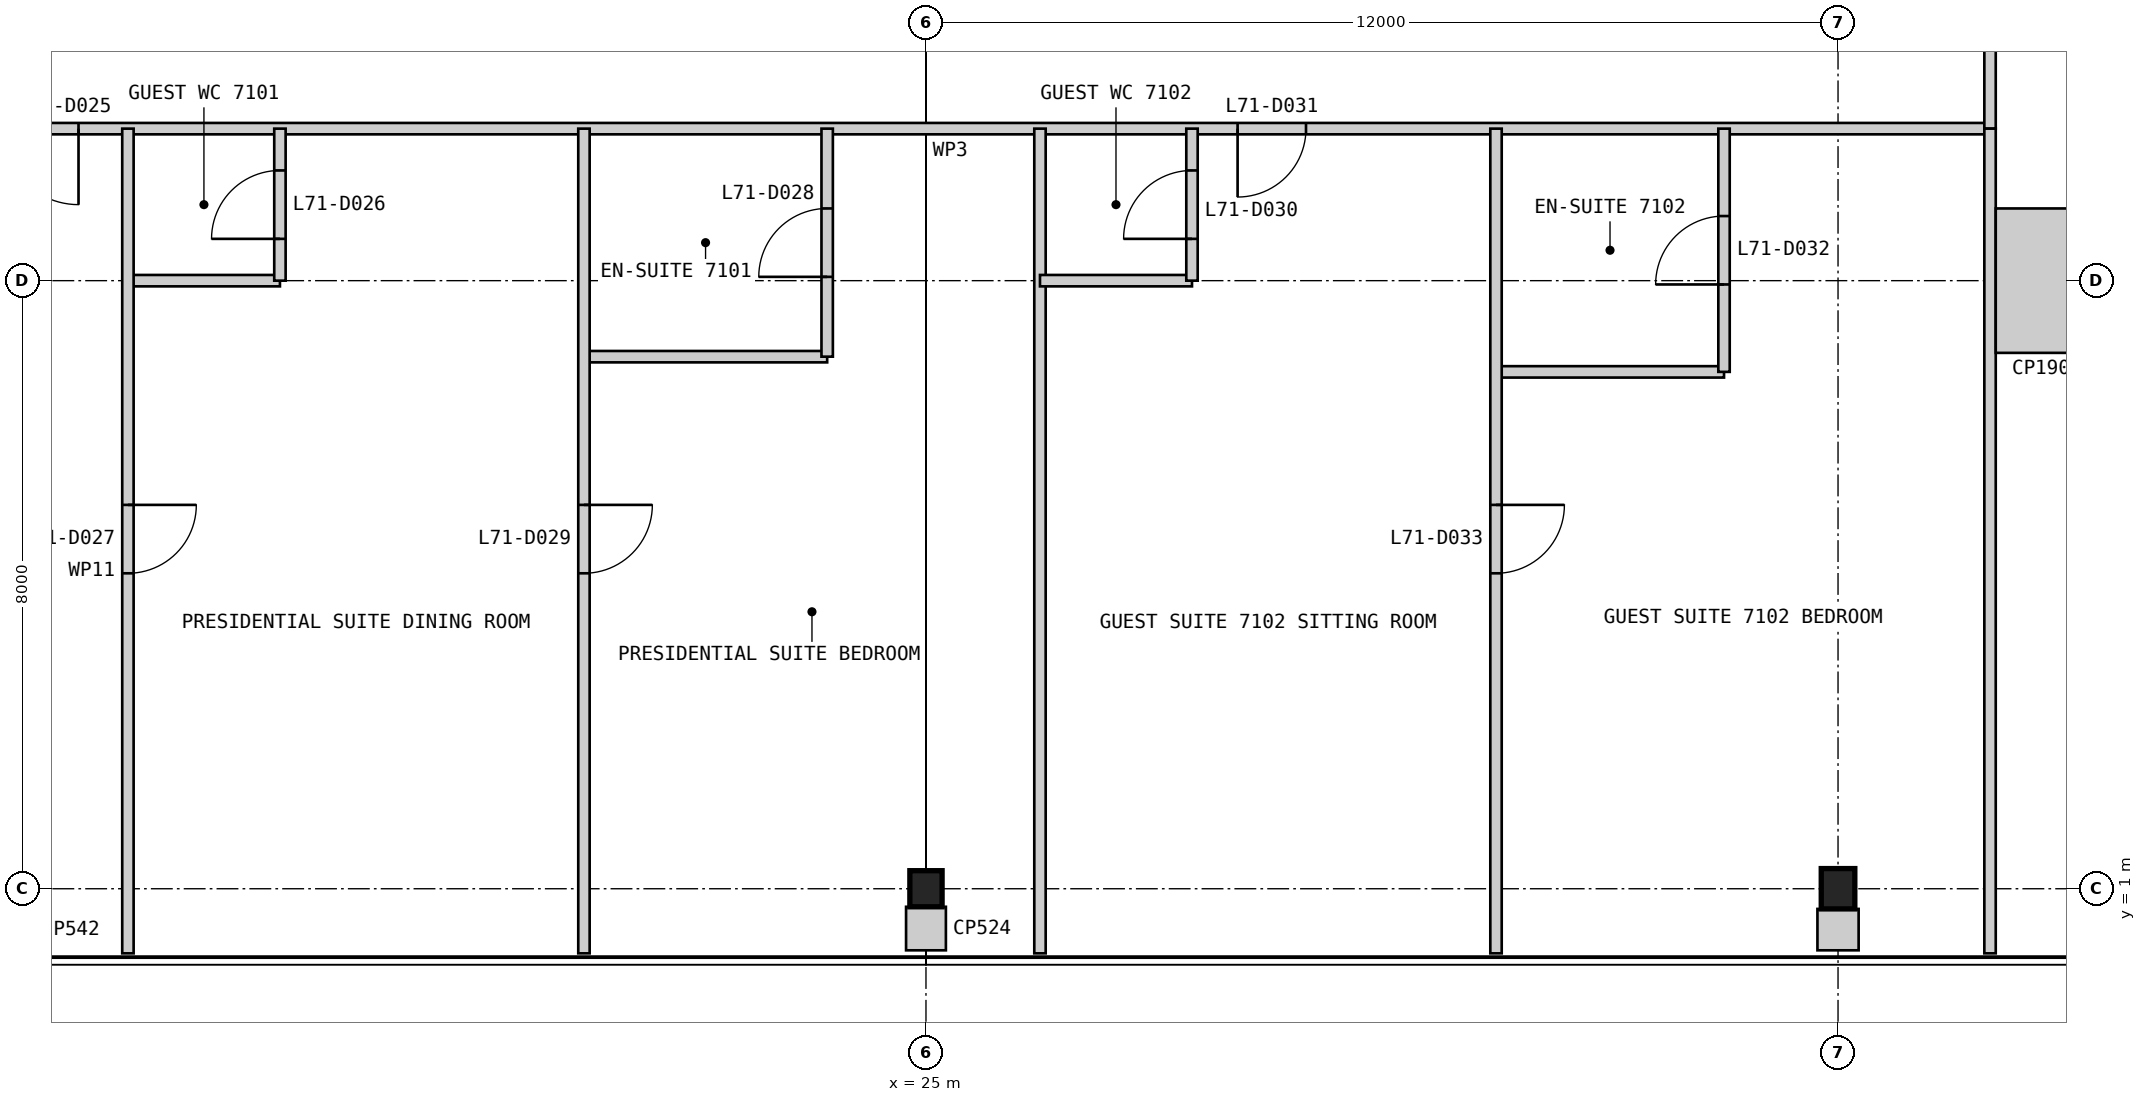
"""IFC4 building model, lengths in metres.
Left out: names, types, materials, properties, quantities, classifications, styles, units other than length and angle.
Written with IfcOpenShell. Run it as: python <this file> out.ifc"""

import sys

from ifc_helpers import new_model, si_unit, direction, frame, frame_2d, origin, origin_2d, place, context, subcontext, project, spatial, rectangle, i_section, extrude, element, fill, save


model = new_model("IFC4")
c1 = context("Model", 3, precision=1e-05, world=origin(), true_north=direction((0.0, 1.0)))
c2 = subcontext(c1, "Body", "Model", "MODEL_VIEW")
j1 = project(units=[si_unit("LENGTHUNIT", "METRE"), si_unit("PLANEANGLEUNIT", "RADIAN")], contexts=[c1])
p1 = place(None, origin())
s1 = spatial("IfcSite", under=j1, at=p1, CompositionType="ELEMENT")
p2 = place(p1, origin())
s2 = spatial("IfcBuilding", under=s1, at=p2, CompositionType="ELEMENT")
p3 = place(p2, frame((0.0, 0.0, 293.4)))
s3 = spatial("IfcBuildingStorey", under=s2, at=p3, CompositionType="ELEMENT", Elevation=293.4)
p4 = place(p3, frame((25.0, 1.0, 0.0), z_axis=(0.0, 0.0, 1.0), x_axis=(1.0, 0.0, 0.0)))
e1 = element("IfcColumn", 1, at=p4, inside=s3, PredefinedType="COLUMN", context=c2, shape_type="SweptSolid", body=[
    extrude(i_section(OverallWidth=0.424, OverallDepth=0.475, WebThickness=0.048, FlangeThickness=0.077, at=origin_2d()), origin(), (0.0, 0.0, 1.0), 3.4),
])
p5 = place(p3, frame((37.0, 1.0, 0.0), z_axis=(0.0, 0.0, 1.0), x_axis=(1.0, 0.0, 0.0)))
e2 = element("IfcColumn", 2, at=p5, inside=s3, PredefinedType="COLUMN", context=c2, shape_type="SweptSolid", body=[
    extrude(i_section(OverallWidth=0.442, OverallDepth=0.531, WebThickness=0.066, FlangeThickness=0.106, at=origin_2d()), origin(), (0.0, 0.0, 1.0), 3.4),
])
p6 = place(p3, frame((11.0, 11.0, 0.0), z_axis=(0.0, 0.0, 1.0), x_axis=(1.0, 0.0, 0.0)))
e3 = element("IfcWall", 3, at=p6, inside=s3, PredefinedType="PARTITIONING", context=c2, shape_type="SweptSolid", body=[
    extrude(rectangle(XDim=28.0, YDim=0.15, at=frame_2d((14.0, 0.0))), origin(), (0.0, 0.0, 1.0), 2.794),
])
p7 = place(p6, frame((1.85, 0.0, 0.0)))
e4 = element("IfcOpeningElement", 4, at=p7, cuts=e3, PredefinedType="OPENING", context=c2, shape_type="SweptSolid", body=[
    extrude(rectangle(XDim=1.0, YDim=2.1, at=frame_2d((0.5, 1.05))), frame((0.0, 0.085, 0.0), z_axis=(0.0, -1.0, 0.0), x_axis=(1.0, 0.0, 0.0)), (0.0, 0.0, 1.0), 0.17),
])
p8 = place(p6, frame((18.1, 0.0, 0.0)))
e5 = element("IfcOpeningElement", 5, at=p8, cuts=e3, PredefinedType="OPENING", context=c2, shape_type="SweptSolid", body=[
    extrude(rectangle(XDim=0.9, YDim=2.1, at=frame_2d((0.45, 1.05))), frame((0.0, 0.085, 0.0), z_axis=(0.0, -1.0, 0.0), x_axis=(1.0, 0.0, 0.0)), (0.0, 0.0, 1.0), 0.17),
])
p9 = place(p3, frame((14.5, 9.0, 0.0), z_axis=(0.0, 0.0, 1.0), x_axis=(1.0, 0.0, 0.0)))
e6 = element("IfcWall", 6, at=p9, inside=s3, PredefinedType="PARTITIONING", context=c2, shape_type="SweptSolid", body=[
    extrude(rectangle(XDim=2.0, YDim=0.15, at=frame_2d((1.0, 0.0))), origin(), (0.0, 0.0, 1.0), 3.2),
])
p10 = place(p3, frame((16.5, 9.0, 0.0), z_axis=(0.0, 0.0, 1.0), x_axis=(0.0, 1.0, 0.0)))
e7 = element("IfcWall", 7, at=p10, inside=s3, PredefinedType="PARTITIONING", context=c2, shape_type="SweptSolid", body=[
    extrude(rectangle(XDim=2.0, YDim=0.15, at=frame_2d((1.0, 0.0))), origin(), (0.0, 0.0, 1.0), 3.2),
])
p11 = place(p10, frame((0.55, 0.0, 0.0)))
e8 = element("IfcOpeningElement", 8, at=p11, cuts=e7, PredefinedType="OPENING", context=c2, shape_type="SweptSolid", body=[
    extrude(rectangle(XDim=0.9, YDim=2.1, at=frame_2d((0.45, 1.05))), frame((0.0, 0.085, 0.0), z_axis=(0.0, -1.0, 0.0), x_axis=(1.0, 0.0, 0.0)), (0.0, 0.0, 1.0), 0.17),
])
p12 = place(p3, frame((14.5, 0.15, 0.0), z_axis=(0.0, 0.0, 1.0), x_axis=(0.0, 1.0, 0.0)))
e9 = element("IfcWall", 9, at=p12, inside=s3, PredefinedType="PARTITIONING", context=c2, shape_type="SweptSolid", body=[
    extrude(rectangle(XDim=10.85, YDim=0.15, at=frame_2d((5.425, 0.0))), origin(), (0.0, 0.0, 1.0), 3.2),
])
p13 = place(p12, frame((5.0, 0.0, 0.0)))
e10 = element("IfcOpeningElement", 10, at=p13, cuts=e9, PredefinedType="OPENING", context=c2, shape_type="SweptSolid", body=[
    extrude(rectangle(XDim=0.9, YDim=2.1, at=frame_2d((0.45, 1.05))), frame((0.0, 0.085, 0.0), z_axis=(0.0, -1.0, 0.0), x_axis=(1.0, 0.0, 0.0)), (0.0, 0.0, 1.0), 0.17),
])
p14 = place(p3, frame((20.5, 8.0, 0.0), z_axis=(0.0, 0.0, 1.0), x_axis=(1.0, 0.0, 0.0)))
e11 = element("IfcWall", 11, at=p14, inside=s3, PredefinedType="PARTITIONING", context=c2, shape_type="SweptSolid", body=[
    extrude(rectangle(XDim=3.2, YDim=0.15, at=frame_2d((1.6, 0.0))), origin(), (0.0, 0.0, 1.0), 3.2),
])
p15 = place(p3, frame((23.7, 8.0, 0.0), z_axis=(0.0, 0.0, 1.0), x_axis=(0.0, 1.0, 0.0)))
e12 = element("IfcWall", 12, at=p15, inside=s3, PredefinedType="PARTITIONING", context=c2, shape_type="SweptSolid", body=[
    extrude(rectangle(XDim=3.0, YDim=0.15, at=frame_2d((1.5, 0.0))), origin(), (0.0, 0.0, 1.0), 3.2),
])
p16 = place(p15, frame((1.05, 0.0, 0.0)))
e13 = element("IfcOpeningElement", 13, at=p16, cuts=e12, PredefinedType="OPENING", context=c2, shape_type="SweptSolid", body=[
    extrude(rectangle(XDim=0.9, YDim=2.1, at=frame_2d((0.45, 1.05))), frame((0.0, 0.085, 0.0), z_axis=(0.0, -1.0, 0.0), x_axis=(1.0, 0.0, 0.0)), (0.0, 0.0, 1.0), 0.17),
])
p17 = place(p3, frame((20.5, 0.15, 0.0), z_axis=(0.0, 0.0, 1.0), x_axis=(0.0, 1.0, 0.0)))
e14 = element("IfcWall", 14, at=p17, inside=s3, PredefinedType="PARTITIONING", context=c2, shape_type="SweptSolid", body=[
    extrude(rectangle(XDim=10.85, YDim=0.15, at=frame_2d((5.425, 0.0))), origin(), (0.0, 0.0, 1.0), 3.2),
])
p18 = place(p17, frame((5.0, 0.0, 0.0)))
e15 = element("IfcOpeningElement", 15, at=p18, cuts=e14, PredefinedType="OPENING", context=c2, shape_type="SweptSolid", body=[
    extrude(rectangle(XDim=0.9, YDim=2.1, at=frame_2d((0.45, 1.05))), frame((0.0, 0.085, 0.0), z_axis=(0.0, -1.0, 0.0), x_axis=(1.0, 0.0, 0.0)), (0.0, 0.0, 1.0), 0.17),
])
p19 = place(p3, frame((26.5, 0.15, 0.0), z_axis=(0.0, 0.0, 1.0), x_axis=(0.0, 1.0, 0.0)))
e16 = element("IfcWall", 16, at=p19, inside=s3, PredefinedType="PARTITIONING", context=c2, shape_type="SweptSolid", body=[
    extrude(rectangle(XDim=10.85, YDim=0.15, at=frame_2d((5.425, 0.0))), origin(), (0.0, 0.0, 1.0), 3.2),
])
p20 = place(p3, frame((26.5, 9.0, 0.0), z_axis=(0.0, 0.0, 1.0), x_axis=(1.0, 0.0, 0.0)))
e17 = element("IfcWall", 17, at=p20, inside=s3, PredefinedType="PARTITIONING", context=c2, shape_type="SweptSolid", body=[
    extrude(rectangle(XDim=2.0, YDim=0.15, at=frame_2d((1.0, 0.0))), origin(), (0.0, 0.0, 1.0), 3.2),
])
p21 = place(p3, frame((28.5, 9.0, 0.0), z_axis=(0.0, 0.0, 1.0), x_axis=(0.0, 1.0, 0.0)))
e18 = element("IfcWall", 18, at=p21, inside=s3, PredefinedType="PARTITIONING", context=c2, shape_type="SweptSolid", body=[
    extrude(rectangle(XDim=2.0, YDim=0.15, at=frame_2d((1.0, 0.0))), origin(), (0.0, 0.0, 1.0), 3.2),
])
p22 = place(p21, frame((0.55, 0.0, 0.0)))
e19 = element("IfcOpeningElement", 19, at=p22, cuts=e18, PredefinedType="OPENING", context=c2, shape_type="SweptSolid", body=[
    extrude(rectangle(XDim=0.9, YDim=2.1, at=frame_2d((0.45, 1.05))), frame((0.0, 0.085, 0.0), z_axis=(0.0, -1.0, 0.0), x_axis=(1.0, 0.0, 0.0)), (0.0, 0.0, 1.0), 0.17),
])
p23 = place(p3, frame((32.5, 7.8, 0.0), z_axis=(0.0, 0.0, 1.0), x_axis=(1.0, 0.0, 0.0)))
e20 = element("IfcWall", 20, at=p23, inside=s3, PredefinedType="PARTITIONING", context=c2, shape_type="SweptSolid", body=[
    extrude(rectangle(XDim=3.0, YDim=0.15, at=frame_2d((1.5, 0.0))), origin(), (0.0, 0.0, 1.0), 3.2),
])
p24 = place(p3, frame((35.5, 7.8, 0.0), z_axis=(0.0, 0.0, 1.0), x_axis=(0.0, 1.0, 0.0)))
e21 = element("IfcWall", 21, at=p24, inside=s3, PredefinedType="PARTITIONING", context=c2, shape_type="SweptSolid", body=[
    extrude(rectangle(XDim=3.2, YDim=0.15, at=frame_2d((1.6, 0.0))), origin(), (0.0, 0.0, 1.0), 3.2),
])
p25 = place(p24, frame((1.15, 0.0, 0.0)))
e22 = element("IfcOpeningElement", 22, at=p25, cuts=e21, PredefinedType="OPENING", context=c2, shape_type="SweptSolid", body=[
    extrude(rectangle(XDim=0.9, YDim=2.1, at=frame_2d((0.45, 1.05))), frame((0.0, 0.085, 0.0), z_axis=(0.0, -1.0, 0.0), x_axis=(1.0, 0.0, 0.0)), (0.0, 0.0, 1.0), 0.17),
])
p26 = place(p3, frame((32.5, 0.15, 0.0), z_axis=(0.0, 0.0, 1.0), x_axis=(0.0, 1.0, 0.0)))
e23 = element("IfcWall", 23, at=p26, inside=s3, PredefinedType="PARTITIONING", context=c2, shape_type="SweptSolid", body=[
    extrude(rectangle(XDim=10.85, YDim=0.15, at=frame_2d((5.425, 0.0))), origin(), (0.0, 0.0, 1.0), 3.2),
])
p27 = place(p26, frame((5.0, 0.0, 0.0)))
e24 = element("IfcOpeningElement", 24, at=p27, cuts=e23, PredefinedType="OPENING", context=c2, shape_type="SweptSolid", body=[
    extrude(rectangle(XDim=0.9, YDim=2.1, at=frame_2d((0.45, 1.05))), frame((0.0, 0.085, 0.0), z_axis=(0.0, -1.0, 0.0), x_axis=(1.0, 0.0, 0.0)), (0.0, 0.0, 1.0), 0.17),
])
p28 = place(p3, frame((39.0, 11.0, 0.0), z_axis=(0.0, 0.0, 1.0), x_axis=(0.0, 1.0, 0.0)))
e25 = element("IfcWall", 25, at=p28, inside=s3, PredefinedType="PARTITIONING", context=c2, shape_type="SweptSolid", body=[
    extrude(rectangle(XDim=28.0, YDim=0.15, at=frame_2d((14.0, 0.0))), origin(), (0.0, 0.0, 1.0), 2.794),
])
p29 = place(p28, frame((1.85, 0.0, 0.0)))
e26 = element("IfcOpeningElement", 26, at=p29, cuts=e25, PredefinedType="OPENING", context=c2, shape_type="SweptSolid", body=[
    extrude(rectangle(XDim=0.9, YDim=2.1, at=frame_2d((0.45, 1.05))), frame((0.0, 0.085, 0.0), z_axis=(0.0, -1.0, 0.0), x_axis=(1.0, 0.0, 0.0)), (0.0, 0.0, 1.0), 0.17),
])
p30 = place(p28, frame((11.0, 0.0, 0.0)))
e27 = element("IfcOpeningElement", 27, at=p30, cuts=e25, PredefinedType="OPENING", context=c2, shape_type="SweptSolid", body=[
    extrude(rectangle(XDim=0.9, YDim=2.1, at=frame_2d((0.45, 1.05))), frame((0.0, 0.085, 0.0), z_axis=(0.0, -1.0, 0.0), x_axis=(1.0, 0.0, 0.0)), (0.0, 0.0, 1.0), 0.17),
])
p31 = place(p28, frame((23.1, 0.0, 0.0)))
e28 = element("IfcOpeningElement", 28, at=p31, cuts=e25, PredefinedType="OPENING", context=c2, shape_type="SweptSolid", body=[
    extrude(rectangle(XDim=0.9, YDim=2.1, at=frame_2d((0.45, 1.05))), frame((0.0, 0.085, 0.0), z_axis=(0.0, -1.0, 0.0), x_axis=(1.0, 0.0, 0.0)), (0.0, 0.0, 1.0), 0.17),
])
p32 = place(p3, frame((39.0, 0.15, 0.0), z_axis=(0.0, 0.0, 1.0), x_axis=(0.0, 1.0, 0.0)))
e29 = element("IfcWall", 29, at=p32, inside=s3, PredefinedType="PARTITIONING", context=c2, shape_type="SweptSolid", body=[
    extrude(rectangle(XDim=10.85, YDim=0.15, at=frame_2d((5.425, 0.0))), origin(), (0.0, 0.0, 1.0), 2.794),
])
p33 = place(p3, frame((25.0, 0.19, 0.0), z_axis=(0.0, 0.0, 1.0), x_axis=(0.0, 1.0, 0.0)))
e30 = element("IfcWall", 30, at=p33, inside=s3, PredefinedType="PARTITIONING", context=c2, shape_type="SweptSolid", body=[
    extrude(rectangle(XDim=0.573, YDim=0.524, at=frame_2d((0.286, 0.0))), origin(), (0.0, 0.0, 1.0), 3.2),
])
p34 = place(p3, frame((37.0, 0.19, 0.0), z_axis=(0.0, 0.0, 1.0), x_axis=(0.0, 1.0, 0.0)))
e31 = element("IfcWall", 31, at=p34, inside=s3, PredefinedType="PARTITIONING", context=c2, shape_type="SweptSolid", body=[
    extrude(rectangle(XDim=0.545, YDim=0.542, at=frame_2d((0.272, 0.0))), origin(), (0.0, 0.0, 1.0), 3.2),
])
p35 = place(p3, frame((39.075, 9.0, 0.0), z_axis=(0.0, 0.0, 1.0), x_axis=(1.0, 0.0, 0.0)))
e32 = element("IfcWall", 32, at=p35, inside=s3, PredefinedType="PARTITIONING", context=c2, shape_type="SweptSolid", body=[
    extrude(rectangle(XDim=1.025, YDim=1.9, at=frame_2d((0.513, 0.0))), origin(), (0.0, 0.0, 1.0), 3.2),
])
p36 = place(p7, frame((1.0, 0.0, 0.0), z_axis=(0.0, 0.0, 1.0), x_axis=(-1.0, 0.0, 0.0)))
e33 = element("IfcDoor", 33, at=p36, inside=s3, OperationType="SINGLE_SWING_LEFT", PredefinedType="DOOR", context=c2, shape_type="SweptSolid", body=[
    extrude(rectangle(XDim=1.0, YDim=2.1, at=frame_2d((0.5, 1.05))), frame((0.0, 0.025, 0.0), z_axis=(0.0, -1.0, 0.0), x_axis=(1.0, 0.0, 0.0)), (0.0, 0.0, 1.0), 0.05),
])
fill(e4, e33)
p37 = place(p11, origin())
e34 = element("IfcDoor", 34, at=p37, inside=s3, OperationType="SINGLE_SWING_LEFT", PredefinedType="DOOR", context=c2, shape_type="SweptSolid", body=[
    extrude(rectangle(XDim=0.9, YDim=2.1, at=frame_2d((0.45, 1.05))), frame((0.0, 0.025, 0.0), z_axis=(0.0, -1.0, 0.0), x_axis=(1.0, 0.0, 0.0)), (0.0, 0.0, 1.0), 0.05),
])
fill(e8, e34)
p38 = place(p13, frame((0.9, 0.0, 0.0), z_axis=(0.0, 0.0, 1.0), x_axis=(-1.0, 0.0, 0.0)))
e35 = element("IfcDoor", 35, at=p38, inside=s3, OperationType="SINGLE_SWING_LEFT", PredefinedType="DOOR", context=c2, shape_type="SweptSolid", body=[
    extrude(rectangle(XDim=0.9, YDim=2.1, at=frame_2d((0.45, 1.05))), frame((0.0, 0.025, 0.0), z_axis=(0.0, -1.0, 0.0), x_axis=(1.0, 0.0, 0.0)), (0.0, 0.0, 1.0), 0.05),
])
fill(e10, e35)
p39 = place(p16, origin())
e36 = element("IfcDoor", 36, at=p39, inside=s3, OperationType="SINGLE_SWING_LEFT", PredefinedType="DOOR", context=c2, shape_type="SweptSolid", body=[
    extrude(rectangle(XDim=0.9, YDim=2.1, at=frame_2d((0.45, 1.05))), frame((0.0, 0.025, 0.0), z_axis=(0.0, -1.0, 0.0), x_axis=(1.0, 0.0, 0.0)), (0.0, 0.0, 1.0), 0.05),
])
fill(e13, e36)
p40 = place(p18, frame((0.9, 0.0, 0.0), z_axis=(0.0, 0.0, 1.0), x_axis=(-1.0, 0.0, 0.0)))
e37 = element("IfcDoor", 37, at=p40, inside=s3, OperationType="SINGLE_SWING_LEFT", PredefinedType="DOOR", context=c2, shape_type="SweptSolid", body=[
    extrude(rectangle(XDim=0.9, YDim=2.1, at=frame_2d((0.45, 1.05))), frame((0.0, 0.025, 0.0), z_axis=(0.0, -1.0, 0.0), x_axis=(1.0, 0.0, 0.0)), (0.0, 0.0, 1.0), 0.05),
])
fill(e15, e37)
p41 = place(p22, origin())
e38 = element("IfcDoor", 38, at=p41, inside=s3, OperationType="SINGLE_SWING_LEFT", PredefinedType="DOOR", context=c2, shape_type="SweptSolid", body=[
    extrude(rectangle(XDim=0.9, YDim=2.1, at=frame_2d((0.45, 1.05))), frame((0.0, 0.025, 0.0), z_axis=(0.0, -1.0, 0.0), x_axis=(1.0, 0.0, 0.0)), (0.0, 0.0, 1.0), 0.05),
])
fill(e19, e38)
p42 = place(p8, frame((0.9, 0.0, 0.0), z_axis=(0.0, 0.0, 1.0), x_axis=(-1.0, 0.0, 0.0)))
e39 = element("IfcDoor", 39, at=p42, inside=s3, OperationType="SINGLE_SWING_RIGHT", PredefinedType="DOOR", context=c2, shape_type="SweptSolid", body=[
    extrude(rectangle(XDim=0.9, YDim=2.1, at=frame_2d((0.45, 1.05))), frame((0.0, 0.025, 0.0), z_axis=(0.0, -1.0, 0.0), x_axis=(1.0, 0.0, 0.0)), (0.0, 0.0, 1.0), 0.05),
])
fill(e5, e39)
p43 = place(p25, origin())
e40 = element("IfcDoor", 40, at=p43, inside=s3, OperationType="SINGLE_SWING_LEFT", PredefinedType="DOOR", context=c2, shape_type="SweptSolid", body=[
    extrude(rectangle(XDim=0.9, YDim=2.1, at=frame_2d((0.45, 1.05))), frame((0.0, 0.025, 0.0), z_axis=(0.0, -1.0, 0.0), x_axis=(1.0, 0.0, 0.0)), (0.0, 0.0, 1.0), 0.05),
])
fill(e22, e40)
p44 = place(p27, frame((0.9, 0.0, 0.0), z_axis=(0.0, 0.0, 1.0), x_axis=(-1.0, 0.0, 0.0)))
e41 = element("IfcDoor", 41, at=p44, inside=s3, OperationType="SINGLE_SWING_LEFT", PredefinedType="DOOR", context=c2, shape_type="SweptSolid", body=[
    extrude(rectangle(XDim=0.9, YDim=2.1, at=frame_2d((0.45, 1.05))), frame((0.0, 0.025, 0.0), z_axis=(0.0, -1.0, 0.0), x_axis=(1.0, 0.0, 0.0)), (0.0, 0.0, 1.0), 0.05),
])
fill(e24, e41)
save(model, sys.argv[1])
